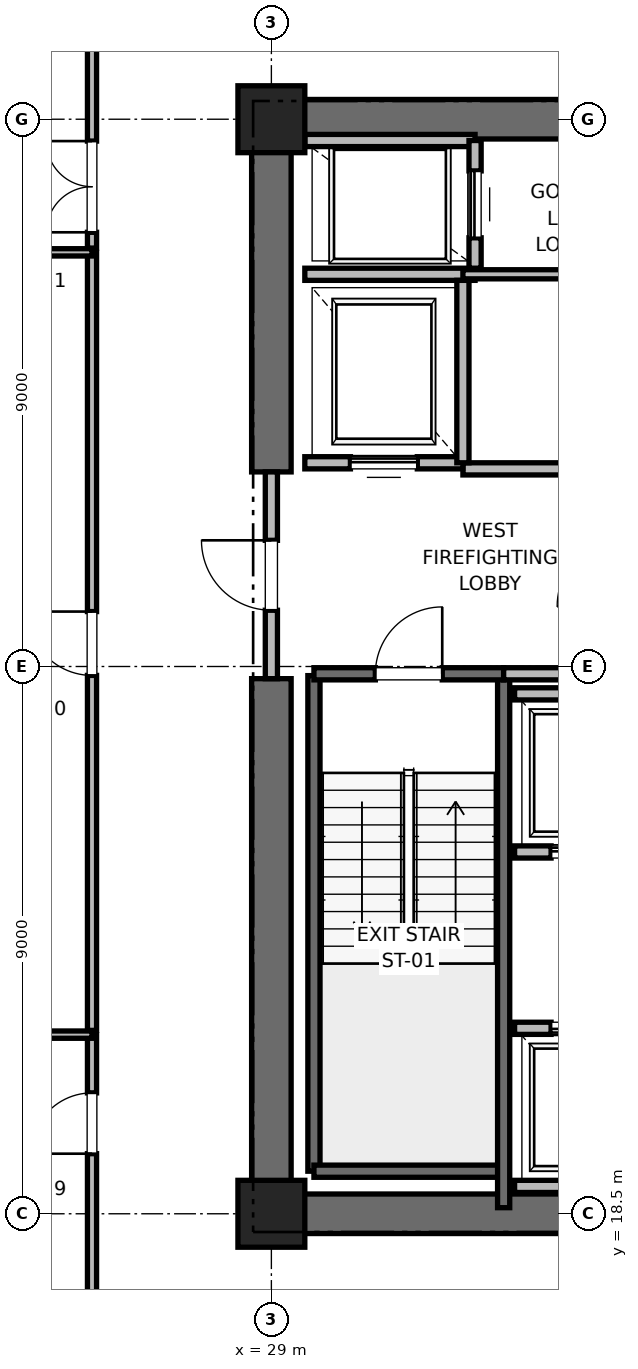
"""IFC4 building model, lengths in metres.
Left out: names, types, materials, properties, quantities, classifications, styles, units other than length and angle.
Written with IfcOpenShell. Run it as: python <this file> out.ifc"""

import sys

from ifc_helpers import new_model, si_unit, direction, frame, frame_2d, origin, origin_2d, place, context, subcontext, project, spatial, rectangle, extrude, element, fill, save


model = new_model("IFC4")
c1 = context("Model", 3, precision=1e-05, world=origin(), true_north=direction((0.0, 1.0)))
c2 = subcontext(c1, "Body", "Model", "MODEL_VIEW")
j1 = project(units=[si_unit("LENGTHUNIT", "METRE"), si_unit("PLANEANGLEUNIT", "RADIAN")], contexts=[c1])
p1 = place(None, origin())
s1 = spatial("IfcSite", under=j1, at=p1, CompositionType="ELEMENT")
p2 = place(p1, origin())
s2 = spatial("IfcBuilding", under=s1, at=p2, CompositionType="ELEMENT")
p3 = place(p2, frame((0.0, 0.0, 103.6)))
s3 = spatial("IfcBuildingStorey", under=s2, at=p3, CompositionType="ELEMENT", Elevation=103.6)
for number, where, z_axis, x_axis in (
    (1, (29.0, 18.5, 0.0), (0.0, 0.0, 1.0), (1.0, 0.0, 0.0)),
    (2, (29.0, 36.5, 0.0), (0.0, 0.0, 1.0), (1.0, 0.0, 0.0)),
):
    element("IfcColumn", number, at=place(p3, frame(where, z_axis=z_axis, x_axis=x_axis)), inside=s3, PredefinedType="PILASTER", context=c2, shape_type="SweptSolid", body=[
        extrude(rectangle(XDim=1.1, YDim=1.1, at=origin_2d()), origin(), (0.0, 0.0, 1.0), 4.0),
    ])
p4 = place(p3, frame((29.0, 18.5, 0.0), z_axis=(0.0, 0.0, 1.0), x_axis=(1.0, 0.0, 0.0)))
e3 = element("IfcWall", 3, at=p4, inside=s3, PredefinedType="SHEAR", context=c2, shape_type="SweptSolid", body=[
    extrude(rectangle(XDim=9.2, YDim=0.65, at=frame_2d((4.6, 0.0))), origin(), (0.0, 0.0, 1.0), 3.7),
])
p5 = place(p3, frame((29.0, 36.5, 0.0), z_axis=(0.0, 0.0, 1.0), x_axis=(1.0, 0.0, 0.0)))
e4 = element("IfcWall", 4, at=p5, inside=s3, PredefinedType="SHEAR", context=c2, shape_type="SweptSolid", body=[
    extrude(rectangle(XDim=5.8, YDim=0.65, at=frame_2d((2.9, 0.0))), origin(), (0.0, 0.0, 1.0), 3.7),
])
p6 = place(p3, frame((29.0, 18.5, 0.0), z_axis=(0.0, 0.0, 1.0), x_axis=(0.0, 1.0, 0.0)))
e5 = element("IfcWall", 5, at=p6, inside=s3, PredefinedType="SHEAR", context=c2, shape_type="SweptSolid", body=[
    extrude(rectangle(XDim=8.8, YDim=0.65, at=frame_2d((4.4, 0.0))), origin(), (0.0, 0.0, 1.0), 3.7),
])
p7 = place(p3, frame((29.0, 30.7, 0.0), z_axis=(0.0, 0.0, 1.0), x_axis=(0.0, 1.0, 0.0)))
e6 = element("IfcWall", 6, at=p7, inside=s3, PredefinedType="SHEAR", context=c2, shape_type="SweptSolid", body=[
    extrude(rectangle(XDim=5.8, YDim=0.65, at=frame_2d((2.9, 0.0))), origin(), (0.0, 0.0, 1.0), 3.7),
])
p8 = place(p3, frame((29.7, 19.2, 0.0), z_axis=(0.0, 0.0, 1.0), x_axis=(0.0, 1.0, 0.0)))
e7 = element("IfcWall", 7, at=p8, inside=s3, PredefinedType="SOLIDWALL", context=c2, shape_type="SweptSolid", body=[
    extrude(rectangle(XDim=8.15, YDim=0.2, at=frame_2d((4.075, 0.0))), origin(), (0.0, 0.0, 1.0), 3.7),
])
p9 = place(p3, frame((29.7, 19.2, 0.0), z_axis=(0.0, 0.0, 1.0), x_axis=(1.0, 0.0, 0.0)))
e8 = element("IfcWall", 8, at=p9, inside=s3, PredefinedType="SOLIDWALL", context=c2, shape_type="SweptSolid", body=[
    extrude(rectangle(XDim=3.12, YDim=0.2, at=frame_2d((1.56, 0.0))), origin(), (0.0, 0.0, 1.0), 3.7),
])
p10 = place(p3, frame((32.82, 18.6, 0.0), z_axis=(0.0, 0.0, 1.0), x_axis=(0.0, 1.0, 0.0)))
e9 = element("IfcWall", 9, at=p10, inside=s3, PredefinedType="SOLIDWALL", context=c2, shape_type="SweptSolid", body=[
    extrude(rectangle(XDim=8.78, YDim=0.2, at=frame_2d((4.39, 0.0))), origin(), (0.0, 0.0, 1.0), 3.7),
])
p11 = place(p3, frame((29.7, 27.38, 0.0), z_axis=(0.0, 0.0, 1.0), x_axis=(1.0, 0.0, 0.0)))
e10 = element("IfcWall", 10, at=p11, inside=s3, PredefinedType="SOLIDWALL", context=c2, shape_type="SweptSolid", body=[
    extrude(rectangle(XDim=3.12, YDim=0.2, at=frame_2d((1.56, 0.0))), origin(), (0.0, 0.0, 1.0), 3.7),
])
p12 = place(p11, frame((1.01, 0.0, 0.0)))
e11 = element("IfcOpeningElement", 11, at=p12, cuts=e10, PredefinedType="OPENING", context=c2, shape_type="SweptSolid", body=[
    extrude(rectangle(XDim=1.1, YDim=2.15, at=frame_2d((0.55, 1.075))), frame((0.0, 0.1, 0.0), z_axis=(0.0, -1.0, 0.0), x_axis=(1.0, 0.0, 0.0)), (0.0, 0.0, 1.0), 0.2),
])
p13 = place(p3, frame((29.0, 27.3, 0.0), z_axis=(0.0, 0.0, 1.0), x_axis=(0.0, 1.0, 0.0)))
e12 = element("IfcWall", 12, at=p13, inside=s3, PredefinedType="PARTITIONING", context=c2, shape_type="SweptSolid", body=[
    extrude(rectangle(XDim=3.4, YDim=0.2, at=frame_2d((1.7, 0.0))), origin(), (0.0, 0.0, 1.0), 2.48),
])
p14 = place(p13, frame((1.125, 0.0, 0.0)))
e13 = element("IfcOpeningElement", 13, at=p14, cuts=e12, PredefinedType="OPENING", context=c2, shape_type="SweptSolid", body=[
    extrude(rectangle(XDim=1.15, YDim=2.2, at=frame_2d((0.575, 1.1))), frame((0.0, 0.1, 0.0), z_axis=(0.0, -1.0, 0.0), x_axis=(1.0, 0.0, 0.0)), (0.0, 0.0, 1.0), 0.2),
])
p15 = place(p3, frame((32.82, 27.38, 0.0), z_axis=(0.0, 0.0, 1.0), x_axis=(1.0, 0.0, 0.0)))
e14 = element("IfcWall", 14, at=p15, inside=s3, PredefinedType="PARTITIONING", context=c2, shape_type="SweptSolid", body=[
    extrude(rectangle(XDim=5.62, YDim=0.2, at=frame_2d((2.81, 0.0))), origin(), (0.0, 0.0, 1.0), 3.7),
])
p16 = place(p3, frame((32.15, 30.75, 0.0), z_axis=(0.0, 0.0, 1.0), x_axis=(1.0, 0.0, 0.0)))
e15 = element("IfcWall", 15, at=p16, inside=s3, PredefinedType="PARTITIONING", context=c2, shape_type="SweptSolid", body=[
    extrude(rectangle(XDim=3.13, YDim=0.2, at=frame_2d((1.565, 0.0))), origin(), (0.0, 0.0, 1.0), 3.7),
])
p17 = place(p3, frame((29.55, 30.85, 0.0), z_axis=(0.0, 0.0, 1.0), x_axis=(1.0, 0.0, 0.0)))
e16 = element("IfcWall", 16, at=p17, inside=s3, PredefinedType="SOLIDWALL", context=c2, shape_type="SweptSolid", body=[
    extrude(rectangle(XDim=2.6, YDim=0.2, at=frame_2d((1.3, 0.0))), origin(), (0.0, 0.0, 1.0), 2.48),
])
p18 = place(p17, frame((0.75, 0.0, 0.0)))
e17 = element("IfcOpeningElement", 17, at=p18, cuts=e16, PredefinedType="OPENING", context=c2, shape_type="SweptSolid", body=[
    extrude(rectangle(XDim=1.1, YDim=2.2, at=frame_2d((0.55, 1.1))), frame((0.0, 0.1, 0.0), z_axis=(0.0, -1.0, 0.0), x_axis=(1.0, 0.0, 0.0)), (0.0, 0.0, 1.0), 0.2),
])
p19 = place(p3, frame((29.55, 33.95, 0.0), z_axis=(0.0, 0.0, 1.0), x_axis=(1.0, 0.0, 0.0)))
e18 = element("IfcWall", 18, at=p19, inside=s3, PredefinedType="SOLIDWALL", context=c2, shape_type="SweptSolid", body=[
    extrude(rectangle(XDim=2.8, YDim=0.2, at=frame_2d((1.4, 0.0))), origin(), (0.0, 0.0, 1.0), 3.7),
])
p20 = place(p3, frame((32.15, 30.85, 0.0), z_axis=(0.0, 0.0, 1.0), x_axis=(0.0, 1.0, 0.0)))
e19 = element("IfcWall", 19, at=p20, inside=s3, PredefinedType="SOLIDWALL", context=c2, shape_type="SweptSolid", body=[
    extrude(rectangle(XDim=3.0, YDim=0.2, at=frame_2d((1.5, 0.0))), origin(), (0.0, 0.0, 1.0), 3.7),
])
p21 = place(p3, frame((32.35, 36.15, 0.0), z_axis=(0.0, 0.0, 1.0), x_axis=(-1.0, 0.0, 0.0)))
e20 = element("IfcWall", 20, at=p21, inside=s3, PredefinedType="SOLIDWALL", context=c2, shape_type="SweptSolid", body=[
    extrude(rectangle(XDim=2.8, YDim=0.2, at=frame_2d((1.4, 0.0))), origin(), (0.0, 0.0, 1.0), 2.753),
])
p22 = place(p3, frame((32.35, 34.05, 0.0), z_axis=(0.0, 0.0, 1.0), x_axis=(0.0, 1.0, 0.0)))
e21 = element("IfcWall", 21, at=p22, inside=s3, PredefinedType="SOLIDWALL", context=c2, shape_type="SweptSolid", body=[
    extrude(rectangle(XDim=2.1, YDim=0.2, at=frame_2d((1.05, 0.0))), origin(), (0.0, 0.0, 1.0), 3.7),
])
p23 = place(p22, frame((0.5, 0.0, 0.0)))
e22 = element("IfcOpeningElement", 22, at=p23, cuts=e21, PredefinedType="OPENING", context=c2, shape_type="SweptSolid", body=[
    extrude(rectangle(XDim=1.1, YDim=2.2, at=frame_2d((0.55, 1.1))), frame((0.0, 0.1, 0.0), z_axis=(0.0, -1.0, 0.0), x_axis=(1.0, 0.0, 0.0)), (0.0, 0.0, 1.0), 0.2),
])
p24 = place(p3, frame((33.0, 18.95, 0.0), z_axis=(0.0, 0.0, 1.0), x_axis=(1.0, 0.0, 0.0)))
e23 = element("IfcWall", 23, at=p24, inside=s3, PredefinedType="SOLIDWALL", context=c2, shape_type="SweptSolid", body=[
    extrude(rectangle(XDim=2.3, YDim=0.2, at=frame_2d((1.15, 0.0))), origin(), (0.0, 0.0, 1.0), 3.7),
])
p25 = place(p3, frame((35.3, 21.55, 0.0), z_axis=(0.0, 0.0, 1.0), x_axis=(-1.0, 0.0, 0.0)))
e24 = element("IfcWall", 24, at=p25, inside=s3, PredefinedType="SOLIDWALL", context=c2, shape_type="SweptSolid", body=[
    extrude(rectangle(XDim=2.3, YDim=0.2, at=frame_2d((1.15, 0.0))), origin(), (0.0, 0.0, 1.0), 3.7),
])
p26 = place(p25, frame((0.6, 0.0, 0.0)))
e25 = element("IfcOpeningElement", 25, at=p26, cuts=e24, PredefinedType="OPENING", context=c2, shape_type="SweptSolid", body=[
    extrude(rectangle(XDim=1.1, YDim=2.2, at=frame_2d((0.55, 1.1))), frame((0.0, 0.1, 0.0), z_axis=(0.0, -1.0, 0.0), x_axis=(1.0, 0.0, 0.0)), (0.0, 0.0, 1.0), 0.2),
])
p27 = place(p3, frame((33.0, 24.45, 0.0), z_axis=(0.0, 0.0, 1.0), x_axis=(1.0, 0.0, 0.0)))
e26 = element("IfcWall", 26, at=p27, inside=s3, PredefinedType="SOLIDWALL", context=c2, shape_type="SweptSolid", body=[
    extrude(rectangle(XDim=2.3, YDim=0.2, at=frame_2d((1.15, 0.0))), origin(), (0.0, 0.0, 1.0), 3.7),
])
p28 = place(p27, frame((0.6, 0.0, 0.0)))
e27 = element("IfcOpeningElement", 27, at=p28, cuts=e26, PredefinedType="OPENING", context=c2, shape_type="SweptSolid", body=[
    extrude(rectangle(XDim=1.1, YDim=2.2, at=frame_2d((0.55, 1.1))), frame((0.0, 0.1, 0.0), z_axis=(0.0, -1.0, 0.0), x_axis=(1.0, 0.0, 0.0)), (0.0, 0.0, 1.0), 0.2),
])
p29 = place(p3, frame((35.3, 27.05, 0.0), z_axis=(0.0, 0.0, 1.0), x_axis=(-1.0, 0.0, 0.0)))
e28 = element("IfcWall", 28, at=p29, inside=s3, PredefinedType="SOLIDWALL", context=c2, shape_type="SweptSolid", body=[
    extrude(rectangle(XDim=2.3, YDim=0.2, at=frame_2d((1.15, 0.0))), origin(), (0.0, 0.0, 1.0), 3.7),
])
p30 = place(p3, frame((32.15, 33.95, 0.0), z_axis=(0.0, 0.0, 1.0), x_axis=(1.0, 0.0, 0.0)))
e29 = element("IfcWall", 29, at=p30, inside=s3, PredefinedType="PARTITIONING", context=c2, shape_type="SweptSolid", body=[
    extrude(rectangle(XDim=3.13, YDim=0.15, at=frame_2d((1.565, 0.0))), origin(), (0.0, 0.0, 1.0), 2.85),
])
p31 = place(p3, frame((26.05, 8.581, 0.0), z_axis=(0.0, 0.0, 1.0), x_axis=(0.0, 1.0, 0.0)))
e30 = element("IfcWall", 30, at=p31, inside=s3, PredefinedType="PARTITIONING", context=c2, shape_type="SweptSolid", body=[
    extrude(rectangle(XDim=12.865, YDim=0.15, at=frame_2d((6.432, 0.0))), origin(), (0.0, 0.0, 1.0), 2.753),
])
p32 = place(p31, frame((10.907, 0.0, 0.0)))
e31 = element("IfcOpeningElement", 31, at=p32, cuts=e30, PredefinedType="OPENING", context=c2, shape_type="SweptSolid", body=[
    extrude(rectangle(XDim=1.0, YDim=2.15, at=frame_2d((0.5, 1.075))), frame((0.0, 0.075, 0.0), z_axis=(0.0, -1.0, 0.0), x_axis=(1.0, 0.0, 0.0)), (0.0, 0.0, 1.0), 0.15),
])
p33 = place(p3, frame((13.701, 21.446, 0.0), z_axis=(0.0, 0.0, 1.0), x_axis=(1.0, 0.0, 0.0)))
e32 = element("IfcWall", 32, at=p33, inside=s3, PredefinedType="PARTITIONING", context=c2, shape_type="SweptSolid", body=[
    extrude(rectangle(XDim=12.349, YDim=0.12, at=frame_2d((6.174, 0.0))), origin(), (0.0, 0.0, 1.0), 2.753),
])
p34 = place(p3, frame((26.05, 21.516, 0.0), z_axis=(0.0, 0.0, 1.0), x_axis=(0.0, 1.0, 0.0)))
e33 = element("IfcWall", 33, at=p34, inside=s3, PredefinedType="PARTITIONING", context=c2, shape_type="SweptSolid", body=[
    extrude(rectangle(XDim=12.795, YDim=0.15, at=frame_2d((6.397, 0.0))), origin(), (0.0, 0.0, 1.0), 2.85),
])
p35 = place(p34, frame((5.837, 0.0, 0.0)))
e34 = element("IfcOpeningElement", 34, at=p35, cuts=e33, PredefinedType="OPENING", context=c2, shape_type="SweptSolid", body=[
    extrude(rectangle(XDim=1.05, YDim=2.2, at=frame_2d((0.525, 1.1))), frame((0.0, 0.075, 0.0), z_axis=(0.0, -1.0, 0.0), x_axis=(1.0, 0.0, 0.0)), (0.0, 0.0, 1.0), 0.15),
])
p36 = place(p3, frame((13.701, 34.311, 0.0), z_axis=(0.0, 0.0, 1.0), x_axis=(1.0, 0.0, 0.0)))
e35 = element("IfcWall", 35, at=p36, inside=s3, PredefinedType="PARTITIONING", context=c2, shape_type="SweptSolid", body=[
    extrude(rectangle(XDim=12.349, YDim=0.12, at=frame_2d((6.174, 0.0))), origin(), (0.0, 0.0, 1.0), 2.753),
])
p37 = place(p3, frame((26.05, 34.381, 0.0), z_axis=(0.0, 0.0, 1.0), x_axis=(0.0, 1.0, 0.0)))
e36 = element("IfcWall", 36, at=p37, inside=s3, PredefinedType="PARTITIONING", context=c2, shape_type="SweptSolid", body=[
    extrude(rectangle(XDim=12.038, YDim=0.15, at=frame_2d((6.019, 0.0))), origin(), (0.0, 0.0, 1.0), 2.753),
])
p38 = place(p37, frame((0.26, 0.0, 0.0)))
e37 = element("IfcOpeningElement", 37, at=p38, cuts=e36, PredefinedType="OPENING", context=c2, shape_type="SweptSolid", body=[
    extrude(rectangle(XDim=1.5, YDim=2.25, at=frame_2d((0.75, 1.125))), frame((0.0, 0.075, 0.0), z_axis=(0.0, -1.0, 0.0), x_axis=(1.0, 0.0, 0.0)), (0.0, 0.0, 1.0), 0.15),
])
p39 = place(p12, origin())
e38 = element("IfcDoor", 38, at=p39, inside=s3, OperationType="SINGLE_SWING_RIGHT", PredefinedType="DOOR", context=c2, shape_type="SweptSolid", body=[
    extrude(rectangle(XDim=1.1, YDim=2.15, at=frame_2d((0.55, 1.075))), frame((0.0, 0.025, 0.0), z_axis=(0.0, -1.0, 0.0), x_axis=(1.0, 0.0, 0.0)), (0.0, 0.0, 1.0), 0.05),
])
fill(e11, e38)
p40 = place(p14, origin())
e39 = element("IfcDoor", 39, at=p40, inside=s3, OperationType="SINGLE_SWING_RIGHT", PredefinedType="DOOR", context=c2, shape_type="SweptSolid", body=[
    extrude(rectangle(XDim=1.15, YDim=2.2, at=frame_2d((0.575, 1.1))), frame((0.0, 0.025, 0.0), z_axis=(0.0, -1.0, 0.0), x_axis=(1.0, 0.0, 0.0)), (0.0, 0.0, 1.0), 0.05),
])
fill(e13, e39)
p41 = place(p18, origin())
e40 = element("IfcDoor", 40, at=p41, inside=s3, OperationType="SLIDING_TO_RIGHT", PredefinedType="DOOR", context=c2, shape_type="SweptSolid", body=[
    extrude(rectangle(XDim=1.1, YDim=2.2, at=frame_2d((0.55, 1.1))), frame((0.0, 0.025, 0.0), z_axis=(0.0, -1.0, 0.0), x_axis=(1.0, 0.0, 0.0)), (0.0, 0.0, 1.0), 0.05),
])
fill(e17, e40)
p42 = place(p23, origin())
e41 = element("IfcDoor", 41, at=p42, inside=s3, OperationType="SLIDING_TO_RIGHT", PredefinedType="DOOR", context=c2, shape_type="SweptSolid", body=[
    extrude(rectangle(XDim=1.1, YDim=2.2, at=frame_2d((0.55, 1.1))), frame((0.0, 0.025, 0.0), z_axis=(0.0, -1.0, 0.0), x_axis=(1.0, 0.0, 0.0)), (0.0, 0.0, 1.0), 0.05),
])
fill(e22, e41)
p43 = place(p26, origin())
e42 = element("IfcDoor", 42, at=p43, inside=s3, OperationType="SLIDING_TO_RIGHT", PredefinedType="DOOR", context=c2, shape_type="SweptSolid", body=[
    extrude(rectangle(XDim=1.1, YDim=2.2, at=frame_2d((0.55, 1.1))), frame((0.0, 0.025, 0.0), z_axis=(0.0, -1.0, 0.0), x_axis=(1.0, 0.0, 0.0)), (0.0, 0.0, 1.0), 0.05),
])
fill(e25, e42)
p44 = place(p28, origin())
e43 = element("IfcDoor", 43, at=p44, inside=s3, OperationType="SLIDING_TO_RIGHT", PredefinedType="DOOR", context=c2, shape_type="SweptSolid", body=[
    extrude(rectangle(XDim=1.1, YDim=2.2, at=frame_2d((0.55, 1.1))), frame((0.0, 0.025, 0.0), z_axis=(0.0, -1.0, 0.0), x_axis=(1.0, 0.0, 0.0)), (0.0, 0.0, 1.0), 0.05),
])
fill(e27, e43)
p45 = place(p32, origin())
e44 = element("IfcDoor", 44, at=p45, inside=s3, OperationType="SINGLE_SWING_LEFT", PredefinedType="DOOR", context=c2, shape_type="SweptSolid", body=[
    extrude(rectangle(XDim=1.0, YDim=2.15, at=frame_2d((0.5, 1.075))), frame((0.0, 0.025, 0.0), z_axis=(0.0, -1.0, 0.0), x_axis=(1.0, 0.0, 0.0)), (0.0, 0.0, 1.0), 0.05),
])
fill(e31, e44)
p46 = place(p35, origin())
e45 = element("IfcDoor", 45, at=p46, inside=s3, OperationType="SINGLE_SWING_RIGHT", PredefinedType="DOOR", context=c2, shape_type="SweptSolid", body=[
    extrude(rectangle(XDim=1.05, YDim=2.2, at=frame_2d((0.525, 1.1))), frame((0.0, 0.025, 0.0), z_axis=(0.0, -1.0, 0.0), x_axis=(1.0, 0.0, 0.0)), (0.0, 0.0, 1.0), 0.05),
])
fill(e34, e45)
p47 = place(p38, origin())
e46 = element("IfcDoor", 46, at=p47, inside=s3, OperationType="DOUBLE_DOOR_SINGLE_SWING", PredefinedType="DOOR", context=c2, shape_type="SweptSolid", body=[
    extrude(rectangle(XDim=1.5, YDim=2.25, at=frame_2d((0.75, 1.125))), frame((0.0, 0.025, 0.0), z_axis=(0.0, -1.0, 0.0), x_axis=(1.0, 0.0, 0.0)), (0.0, 0.0, 1.0), 0.05),
])
fill(e37, e46)
save(model, sys.argv[1])
